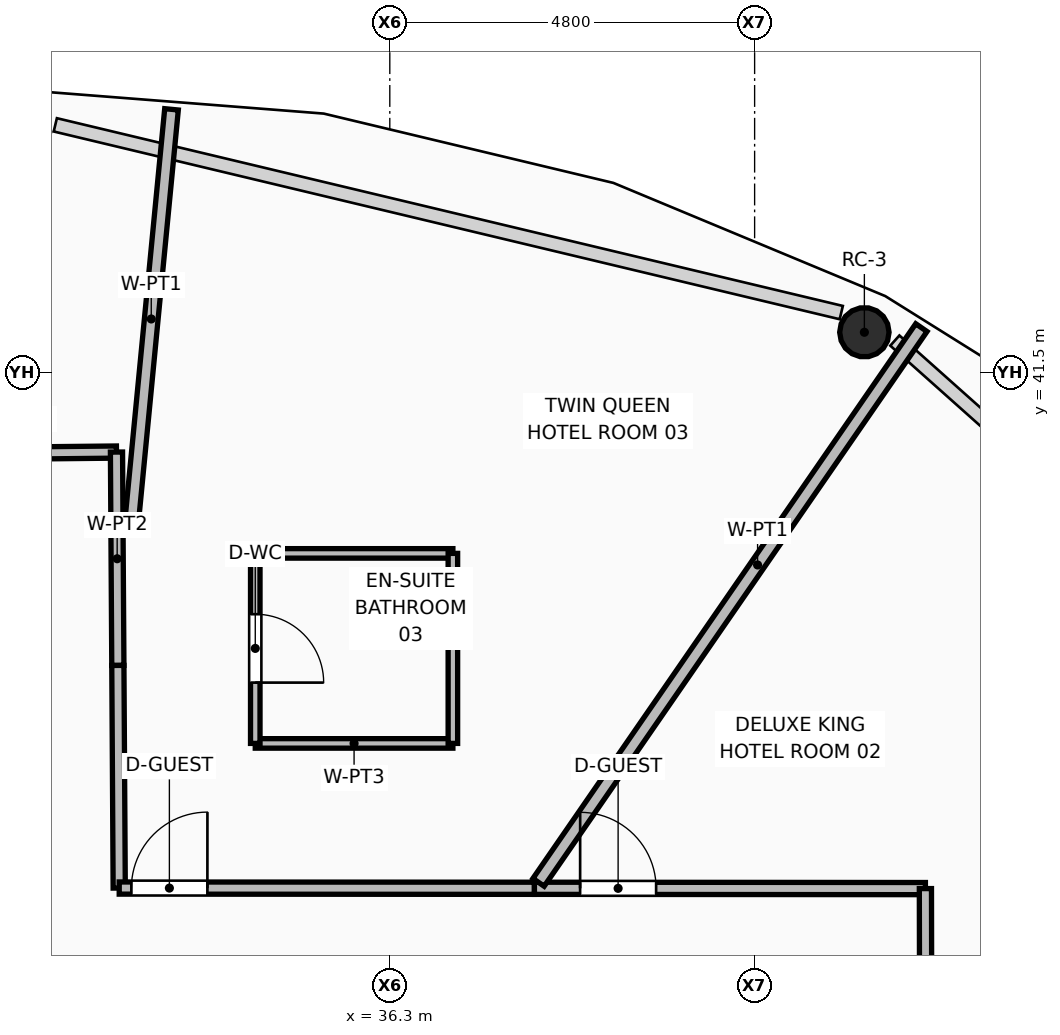
"""IFC4 building model, lengths in metres.
Left out: names, types, materials, properties, quantities, classifications, styles, units other than length and angle.
Written with IfcOpenShell. Run it as: python <this file> out.ifc"""

import sys

from ifc_helpers import new_model, si_unit, direction, frame, frame_2d, origin, origin_2d, place, context, subcontext, project, spatial, rectangle, hollow_circle, extrude, element, fill, save


model = new_model("IFC4")
c1 = context("Model", 3, precision=1e-05, world=origin(), true_north=direction((0.0, 1.0)))
c2 = subcontext(c1, "Body", "Model", "MODEL_VIEW")
j1 = project(units=[si_unit("LENGTHUNIT", "METRE"), si_unit("PLANEANGLEUNIT", "RADIAN")], contexts=[c1])
p1 = place(None, origin())
s1 = spatial("IfcSite", under=j1, at=p1, CompositionType="ELEMENT")
p2 = place(p1, origin())
s2 = spatial("IfcBuilding", under=s1, at=p2, CompositionType="ELEMENT")
p3 = place(p2, frame((0.0, 0.0, 216.15)))
s3 = spatial("IfcBuildingStorey", under=s2, at=p3, CompositionType="ELEMENT", Elevation=216.15)
p4 = place(p3, frame((42.544, 42.027, 0.0), z_axis=(-0.010597834049, -0.015725818266, 0.999820176108), x_axis=(0.829266427591, -0.558853462072, 0.0)))
e1 = element("IfcColumn", 1, at=p4, inside=s3, PredefinedType="COLUMN", context=c2, shape_type="SweptSolid", body=[
    extrude(hollow_circle(Radius=0.325, WallThickness=0.03, at=origin_2d()), origin(), (0.0, 0.0, 1.0), 3.571),
])
p5 = place(p3, frame((30.263, 40.426, 0.0), z_axis=(0.0, 0.0, 1.0), x_axis=(0.999947973655, 0.01020048938, 0.0)))
e2 = element("IfcWall", 2, at=p5, inside=s3, PredefinedType="PARTITIONING", context=c2, shape_type="SweptSolid", body=[
    extrude(rectangle(XDim=2.441, YDim=0.16, at=frame_2d((1.221, 0.0))), origin(), (0.0, 0.0, 1.0), 3.081),
])
p6 = place(p3, frame((32.704, 40.451, 0.0), z_axis=(0.0, 0.0, 1.0), x_axis=(0.006349354485, -0.999979842646, 0.0)))
e3 = element("IfcWall", 3, at=p6, inside=s3, PredefinedType="PARTITIONING", context=c2, shape_type="SweptSolid", body=[
    extrude(rectangle(XDim=2.807, YDim=0.16, at=frame_2d((1.403, 0.0))), origin(), (0.0, 0.0, 1.0), 3.55),
])
p7 = place(p3, frame((32.722, 37.644, 0.0), z_axis=(0.0, 0.0, 1.0), x_axis=(0.006168091382, -0.999980977143, 0.0)))
e4 = element("IfcWall", 4, at=p7, inside=s3, PredefinedType="PARTITIONING", context=c2, shape_type="SweptSolid", body=[
    extrude(rectangle(XDim=2.929, YDim=0.16, at=frame_2d((1.464, 0.0))), origin(), (0.0, 0.0, 1.0), 3.55),
])
p8 = place(p3, frame((32.74, 34.715, 0.0), z_axis=(0.0, 0.0, 1.0), x_axis=(0.999999831231, -0.000580979523, 0.0)))
e5 = element("IfcWall", 5, at=p8, inside=s3, PredefinedType="PARTITIONING", context=c2, shape_type="SweptSolid", body=[
    extrude(rectangle(XDim=5.463, YDim=0.16, at=frame_2d((2.731, 0.0))), origin(), (0.0, 0.0, 1.0), 3.55),
])
p9 = place(p8, frame((0.16, 0.0, 0.0)))
e6 = element("IfcOpeningElement", 6, at=p9, cuts=e5, PredefinedType="OPENING", context=c2, shape_type="SweptSolid", body=[
    extrude(rectangle(XDim=1.0, YDim=2.1, at=frame_2d((0.5, 1.05))), frame((0.0, 0.09, 0.0), z_axis=(0.0, -1.0, 0.0), x_axis=(1.0, 0.0, 0.0)), (0.0, 0.0, 1.0), 0.18),
])
p10 = place(p3, frame((38.203, 34.712, 0.0), z_axis=(0.0, 0.0, 1.0), x_axis=(0.999999711676, -0.000759373298, 0.0)))
e7 = element("IfcWall", 7, at=p10, inside=s3, PredefinedType="PARTITIONING", context=c2, shape_type="SweptSolid", body=[
    extrude(rectangle(XDim=5.144, YDim=0.16, at=frame_2d((2.572, 0.0))), origin(), (0.0, 0.0, 1.0), 3.081),
])
p11 = place(p10, frame((0.601, 0.0, 0.0)))
e8 = element("IfcOpeningElement", 8, at=p11, cuts=e7, PredefinedType="OPENING", context=c2, shape_type="SweptSolid", body=[
    extrude(rectangle(XDim=1.0, YDim=2.1, at=frame_2d((0.5, 1.05))), frame((0.0, 0.09, 0.0), z_axis=(0.0, -1.0, 0.0), x_axis=(1.0, 0.0, 0.0)), (0.0, 0.0, 1.0), 0.18),
])
p12 = place(p3, frame((43.347, 34.708, 0.0), z_axis=(0.0, 0.0, 1.0), x_axis=(0.00203317732, -0.999997933093, 0.0)))
e9 = element("IfcWall", 9, at=p12, inside=s3, PredefinedType="PARTITIONING", context=c2, shape_type="SweptSolid", body=[
    extrude(rectangle(XDim=3.002, YDim=0.16, at=frame_2d((1.501, 0.0))), origin(), (0.0, 0.0, 1.0), 3.081),
])
p13 = place(p3, frame((43.44, 31.755, 0.0), z_axis=(0.0, 0.0, 1.0), x_axis=(0.870350829843, 0.492432160802, 0.0)))
e10 = element("IfcWall", 10, at=p13, inside=s3, PredefinedType="PARTITIONING", context=c2, shape_type="SweptSolid", body=[
    extrude(rectangle(XDim=8.089, YDim=0.18, at=frame_2d((4.044, 0.0))), origin(), (0.0, 0.0, 1.0), 2.925),
])
p14 = place(p3, frame((38.257, 34.79, 0.0), z_axis=(0.0, 0.0, 1.0), x_axis=(0.56802823634, 0.823009066001, 0.0)))
e11 = element("IfcWall", 11, at=p14, inside=s3, PredefinedType="PARTITIONING", context=c2, shape_type="SweptSolid", body=[
    extrude(rectangle(XDim=8.867, YDim=0.18, at=frame_2d((4.434, 0.0))), origin(), (0.0, 0.0, 1.0), 2.925),
])
p15 = place(p3, frame((32.895, 39.444, 0.0), z_axis=(0.0, 0.0, 1.0), x_axis=(0.096174947315, 0.995364445572, 0.0)))
e12 = element("IfcWall", 12, at=p15, inside=s3, PredefinedType="PARTITIONING", context=c2, shape_type="SweptSolid", body=[
    extrude(rectangle(XDim=5.542, YDim=0.18, at=frame_2d((2.771, 0.0))), origin(), (0.0, 0.0, 1.0), 2.925),
])
for number, where, z_axis, x_axis in (
    (13, (34.53, 36.618, 0.0), (0.0, 0.0, 1.0), (1.0, 0.0, 0.0)),
    (14, (34.53, 39.118, 0.0), (0.0, 0.0, 1.0), (1.0, 0.0, 0.0)),
):
    element("IfcWall", number, at=place(p3, frame(where, z_axis=z_axis, x_axis=x_axis)), inside=s3, PredefinedType="PARTITIONING", context=c2, shape_type="SweptSolid", body=[
        extrude(rectangle(XDim=2.6, YDim=0.125, at=frame_2d((1.3, 0.0))), origin(), (0.0, 0.0, 1.0), 3.55),
    ])
p16 = place(p3, frame((34.53, 36.618, 0.0), z_axis=(0.0, 0.0, 1.0), x_axis=(0.0, 1.0, 0.0)))
e15 = element("IfcWall", 15, at=p16, inside=s3, PredefinedType="PARTITIONING", context=c2, shape_type="SweptSolid", body=[
    extrude(rectangle(XDim=2.5, YDim=0.125, at=frame_2d((1.25, 0.0))), origin(), (0.0, 0.0, 1.0), 3.55),
])
p17 = place(p16, frame((0.8, 0.0, 0.0)))
e16 = element("IfcOpeningElement", 16, at=p17, cuts=e15, PredefinedType="OPENING", context=c2, shape_type="SweptSolid", body=[
    extrude(rectangle(XDim=0.9, YDim=2.1, at=frame_2d((0.45, 1.05))), frame((0.0, 0.073, 0.0), z_axis=(0.0, -1.0, 0.0), x_axis=(1.0, 0.0, 0.0)), (0.0, 0.0, 1.0), 0.145),
])
p18 = place(p3, frame((37.13, 36.618, 0.0), z_axis=(0.0, 0.0, 1.0), x_axis=(0.0, 1.0, 0.0)))
e17 = element("IfcWall", 17, at=p18, inside=s3, PredefinedType="PARTITIONING", context=c2, shape_type="SweptSolid", body=[
    extrude(rectangle(XDim=2.5, YDim=0.125, at=frame_2d((1.25, 0.0))), origin(), (0.0, 0.0, 1.0), 3.55),
])
p19 = place(p11, origin())
e18 = element("IfcDoor", 18, at=p19, inside=s3, OperationType="SINGLE_SWING_LEFT", PredefinedType="DOOR", context=c2, shape_type="SweptSolid", body=[
    extrude(rectangle(XDim=1.0, YDim=2.1, at=frame_2d((0.5, 1.05))), frame((0.0, 0.025, 0.0), z_axis=(0.0, -1.0, 0.0), x_axis=(1.0, 0.0, 0.0)), (0.0, 0.0, 1.0), 0.05),
])
fill(e8, e18)
p20 = place(p17, frame((0.9, 0.0, 0.0), z_axis=(0.0, 0.0, 1.0), x_axis=(-1.0, 0.0, 0.0)))
e19 = element("IfcDoor", 19, at=p20, inside=s3, OperationType="SINGLE_SWING_RIGHT", PredefinedType="DOOR", context=c2, shape_type="SweptSolid", body=[
    extrude(rectangle(XDim=0.9, YDim=2.1, at=frame_2d((0.45, 1.05))), frame((0.0, 0.025, 0.0), z_axis=(0.0, -1.0, 0.0), x_axis=(1.0, 0.0, 0.0)), (0.0, 0.0, 1.0), 0.05),
])
fill(e16, e19)
p21 = place(p9, origin())
e20 = element("IfcDoor", 20, at=p21, inside=s3, OperationType="SINGLE_SWING_RIGHT", PredefinedType="DOOR", context=c2, shape_type="SweptSolid", body=[
    extrude(rectangle(XDim=1.0, YDim=2.1, at=frame_2d((0.5, 1.05))), frame((0.0, 0.025, 0.0), z_axis=(0.0, -1.0, 0.0), x_axis=(1.0, 0.0, 0.0)), (0.0, 0.0, 1.0), 0.05),
])
fill(e6, e20)
save(model, sys.argv[1])
